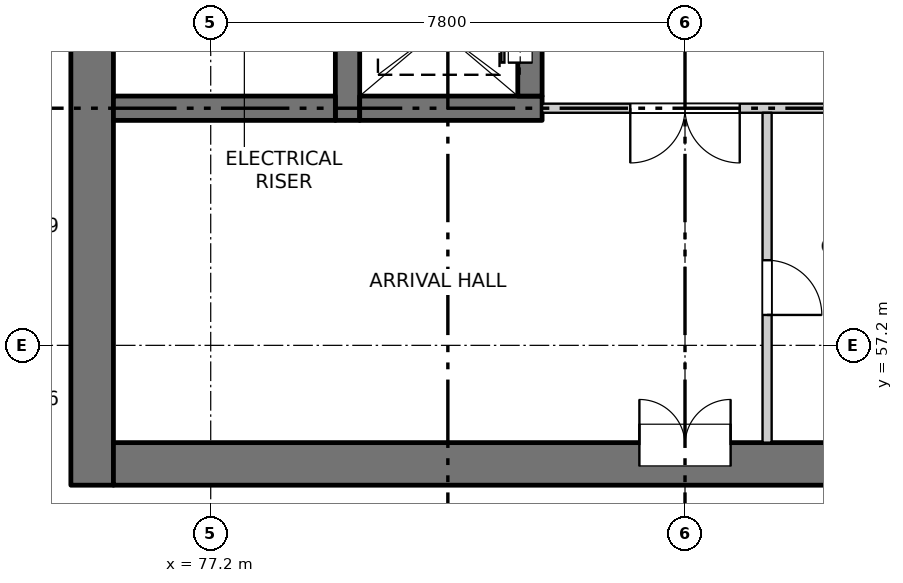
"""IFC4 building model, lengths in metres.
Left out: names, types, materials, properties, quantities, classifications, styles, units other than length and angle.
Written with IfcOpenShell. Run it as: python <this file> out.ifc"""

import sys

from ifc_helpers import new_model, si_unit, direction, frame, frame_2d, origin, place, context, subcontext, project, spatial, rectangle, extrude, element, fill, save


model = new_model("IFC4")
c1 = context("Model", 3, precision=1e-05, world=origin(), true_north=direction((0.0, 1.0)))
c2 = subcontext(c1, "Body", "Model", "MODEL_VIEW")
j1 = project(units=[si_unit("LENGTHUNIT", "METRE"), si_unit("PLANEANGLEUNIT", "RADIAN")], contexts=[c1])
p1 = place(None, origin())
s1 = spatial("IfcSite", under=j1, at=p1, CompositionType="ELEMENT")
p2 = place(p1, origin())
s2 = spatial("IfcBuilding", under=s1, at=p2, CompositionType="ELEMENT")
p3 = place(p2, frame((0.0, 0.0, 71.6)))
s3 = spatial("IfcBuildingStorey", under=s2, at=p3, CompositionType="ELEMENT", Elevation=71.6)
p4 = place(p3, frame((75.25, 54.9, -0.25), z_axis=(0.0, 0.0, 1.0), x_axis=(0.0, 1.0, 0.0)))
e1 = element("IfcWall", 1, at=p4, inside=s3, PredefinedType="SOLIDWALL", context=c2, shape_type="SweptSolid", body=[
    extrude(rectangle(XDim=22.4, YDim=0.7, at=frame_2d((11.2, 0.0))), origin(), (0.0, 0.0, 1.0), 3.4),
])
p5 = place(p4, frame((7.55, 0.0, 0.25)))
e2 = element("IfcOpeningElement", 2, at=p5, cuts=e1, PredefinedType="OPENING", context=c2, shape_type="SweptSolid", body=[
    extrude(rectangle(XDim=0.9, YDim=2.1, at=frame_2d((0.45, 1.05))), frame((0.0, 0.36, 0.0), z_axis=(0.0, -1.0, 0.0), x_axis=(1.0, 0.0, 0.0)), (0.0, 0.0, 1.0), 0.72),
])
p6 = place(p4, frame((10.85, 0.0, 0.25)))
e3 = element("IfcOpeningElement", 3, at=p6, cuts=e1, PredefinedType="OPENING", context=c2, shape_type="SweptSolid", body=[
    extrude(rectangle(XDim=0.9, YDim=2.1, at=frame_2d((0.45, 1.05))), frame((0.0, 0.36, 0.0), z_axis=(0.0, -1.0, 0.0), x_axis=(1.0, 0.0, 0.0)), (0.0, 0.0, 1.0), 0.72),
])
p7 = place(p4, frame((13.85, 0.0, 0.25)))
e4 = element("IfcOpeningElement", 4, at=p7, cuts=e1, PredefinedType="OPENING", context=c2, shape_type="SweptSolid", body=[
    extrude(rectangle(XDim=0.9, YDim=2.1, at=frame_2d((0.45, 1.05))), frame((0.0, 0.36, 0.0), z_axis=(0.0, -1.0, 0.0), x_axis=(1.0, 0.0, 0.0)), (0.0, 0.0, 1.0), 0.72),
])
p8 = place(p4, frame((16.85, 0.0, 0.25)))
e5 = element("IfcOpeningElement", 5, at=p8, cuts=e1, PredefinedType="OPENING", context=c2, shape_type="SweptSolid", body=[
    extrude(rectangle(XDim=0.9, YDim=2.1, at=frame_2d((0.45, 1.05))), frame((0.0, 0.36, 0.0), z_axis=(0.0, -1.0, 0.0), x_axis=(1.0, 0.0, 0.0)), (0.0, 0.0, 1.0), 0.72),
])
p9 = place(p4, frame((20.15, 0.0, 0.25)))
e6 = element("IfcOpeningElement", 6, at=p9, cuts=e1, PredefinedType="OPENING", context=c2, shape_type="SweptSolid", body=[
    extrude(rectangle(XDim=0.9, YDim=2.1, at=frame_2d((0.45, 1.05))), frame((0.0, 0.36, 0.0), z_axis=(0.0, -1.0, 0.0), x_axis=(1.0, 0.0, 0.0)), (0.0, 0.0, 1.0), 0.72),
])
p10 = place(p3, frame((75.6, 55.25, -0.25), z_axis=(0.0, 0.0, 1.0), x_axis=(1.0, 0.0, 0.0)))
e7 = element("IfcWall", 7, at=p10, inside=s3, PredefinedType="SOLIDWALL", context=c2, shape_type="SweptSolid", body=[
    extrude(rectangle(XDim=18.8, YDim=0.7, at=frame_2d((9.4, 0.0))), origin(), (0.0, 0.0, 1.0), 3.4),
])
p11 = place(p10, frame((8.65, 0.0, 0.25)))
e8 = element("IfcOpeningElement", 8, at=p11, cuts=e7, PredefinedType="OPENING", context=c2, shape_type="SweptSolid", body=[
    extrude(rectangle(XDim=1.5, YDim=2.1, at=frame_2d((0.75, 1.05))), frame((0.0, 0.36, 0.0), z_axis=(0.0, -1.0, 0.0), x_axis=(1.0, 0.0, 0.0)), (0.0, 0.0, 1.0), 0.72),
])
p12 = place(p3, frame((79.45, 60.9, -0.25), z_axis=(0.0, 0.0, 1.0), x_axis=(0.0, 1.0, 0.0)))
e9 = element("IfcWall", 9, at=p12, inside=s3, PredefinedType="SOLIDWALL", context=c2, shape_type="SweptSolid", body=[
    extrude(rectangle(XDim=16.4, YDim=0.4, at=frame_2d((8.2, 0.0))), origin(), (0.0, 0.0, 1.0), 3.4),
])
p13 = place(p3, frame((79.65, 61.1, -0.25), z_axis=(0.0, 0.0, 1.0), x_axis=(1.0, 0.0, 0.0)))
e10 = element("IfcWall", 10, at=p13, inside=s3, PredefinedType="SOLIDWALL", context=c2, shape_type="SweptSolid", body=[
    extrude(rectangle(XDim=3.0, YDim=0.4, at=frame_2d((1.5, 0.0))), origin(), (0.0, 0.0, 1.0), 3.4),
])
p14 = place(p3, frame((82.45, 61.3, -0.25), z_axis=(0.0, 0.0, 1.0), x_axis=(0.0, 1.0, 0.0)))
e11 = element("IfcWall", 11, at=p14, inside=s3, PredefinedType="SOLIDWALL", context=c2, shape_type="SweptSolid", body=[
    extrude(rectangle(XDim=2.2, YDim=0.4, at=frame_2d((1.1, 0.0))), origin(), (0.0, 0.0, 1.0), 3.4),
])
p15 = place(p14, frame((0.55, 0.0, 0.25)))
e12 = element("IfcOpeningElement", 12, at=p15, cuts=e11, PredefinedType="OPENING", context=c2, shape_type="SweptSolid", body=[
    extrude(rectangle(XDim=1.1, YDim=2.1, at=frame_2d((0.55, 1.05))), frame((0.0, 0.21, 0.0), z_axis=(0.0, -1.0, 0.0), x_axis=(1.0, 0.0, 0.0)), (0.0, 0.0, 1.0), 0.42),
])
p16 = place(p3, frame((75.6, 61.1, -0.25), z_axis=(0.0, 0.0, 1.0), x_axis=(1.0, 0.0, 0.0)))
e13 = element("IfcWall", 13, at=p16, inside=s3, PredefinedType="SOLIDWALL", context=c2, shape_type="SweptSolid", body=[
    extrude(rectangle(XDim=3.65, YDim=0.4, at=frame_2d((1.825, 0.0))), origin(), (0.0, 0.0, 1.0), 3.4),
])
p17 = place(p3, frame((82.65, 61.1, 0.0), z_axis=(0.0, 0.0, 1.0), x_axis=(1.0, 0.0, 0.0)))
e14 = element("IfcWall", 14, at=p17, inside=s3, PredefinedType="PARTITIONING", context=c2, shape_type="SweptSolid", body=[
    extrude(rectangle(XDim=4.7, YDim=0.15, at=frame_2d((2.35, 0.0))), origin(), (0.0, 0.0, 1.0), 3.15),
])
p18 = place(p17, frame((1.45, 0.0, 0.0)))
e15 = element("IfcOpeningElement", 15, at=p18, cuts=e14, PredefinedType="OPENING", context=c2, shape_type="SweptSolid", body=[
    extrude(rectangle(XDim=1.8, YDim=2.1, at=frame_2d((0.9, 1.05))), frame((0.0, 0.085, 0.0), z_axis=(0.0, -1.0, 0.0), x_axis=(1.0, 0.0, 0.0)), (0.0, 0.0, 1.0), 0.17),
])
p19 = place(p3, frame((86.35, 55.6, 0.0), z_axis=(0.0, 0.0, 1.0), x_axis=(0.0, 1.0, 0.0)))
e16 = element("IfcWall", 16, at=p19, inside=s3, PredefinedType="PARTITIONING", context=c2, shape_type="SweptSolid", body=[
    extrude(rectangle(XDim=5.425, YDim=0.15, at=frame_2d((2.712, 0.0))), origin(), (0.0, 0.0, 1.0), 3.15),
])
p20 = place(p19, frame((2.1, 0.0, 0.0)))
e17 = element("IfcOpeningElement", 17, at=p20, cuts=e16, PredefinedType="OPENING", context=c2, shape_type="SweptSolid", body=[
    extrude(rectangle(XDim=0.9, YDim=2.1, at=frame_2d((0.45, 1.05))), frame((0.0, 0.085, 0.0), z_axis=(0.0, -1.0, 0.0), x_axis=(1.0, 0.0, 0.0)), (0.0, 0.0, 1.0), 0.17),
])
p21 = place(p11, origin())
e18 = element("IfcDoor", 18, at=p21, inside=s3, OperationType="DOUBLE_DOOR_SINGLE_SWING", PredefinedType="DOOR", context=c2, shape_type="SweptSolid", body=[
    extrude(rectangle(XDim=1.5, YDim=2.1, at=frame_2d((0.75, 1.05))), frame((0.0, 0.335, 0.0), z_axis=(0.0, -1.0, 0.0), x_axis=(1.0, 0.0, 0.0)), (0.0, 0.0, 1.0), 0.05),
])
fill(e8, e18)
p22 = place(p20, origin())
e19 = element("IfcDoor", 19, at=p22, inside=s3, OperationType="SINGLE_SWING_RIGHT", PredefinedType="DOOR", context=c2, shape_type="SweptSolid", body=[
    extrude(rectangle(XDim=0.9, YDim=2.1, at=frame_2d((0.45, 1.05))), frame((0.0, 0.025, 0.0), z_axis=(0.0, -1.0, 0.0), x_axis=(1.0, 0.0, 0.0)), (0.0, 0.0, 1.0), 0.05),
])
fill(e17, e19)
p23 = place(p18, origin())
e20 = element("IfcDoor", 20, at=p23, inside=s3, OperationType="DOUBLE_DOOR_SINGLE_SWING", PredefinedType="DOOR", context=c2, shape_type="SweptSolid", body=[
    extrude(rectangle(XDim=1.8, YDim=2.1, at=frame_2d((0.9, 1.05))), frame((0.0, 0.025, 0.0), z_axis=(0.0, -1.0, 0.0), x_axis=(1.0, 0.0, 0.0)), (0.0, 0.0, 1.0), 0.05),
])
fill(e15, e20)
p24 = place(p15, origin())
e21 = element("IfcDoor", 21, at=p24, inside=s3, OperationType="SLIDING_TO_RIGHT", PredefinedType="DOOR", context=c2, shape_type="SweptSolid", body=[
    extrude(rectangle(XDim=1.1, YDim=2.1, at=frame_2d((0.55, 1.05))), frame((0.0, 0.185, 0.0), z_axis=(0.0, -1.0, 0.0), x_axis=(1.0, 0.0, 0.0)), (0.0, 0.0, 1.0), 0.05),
])
fill(e12, e21)
save(model, sys.argv[1])
